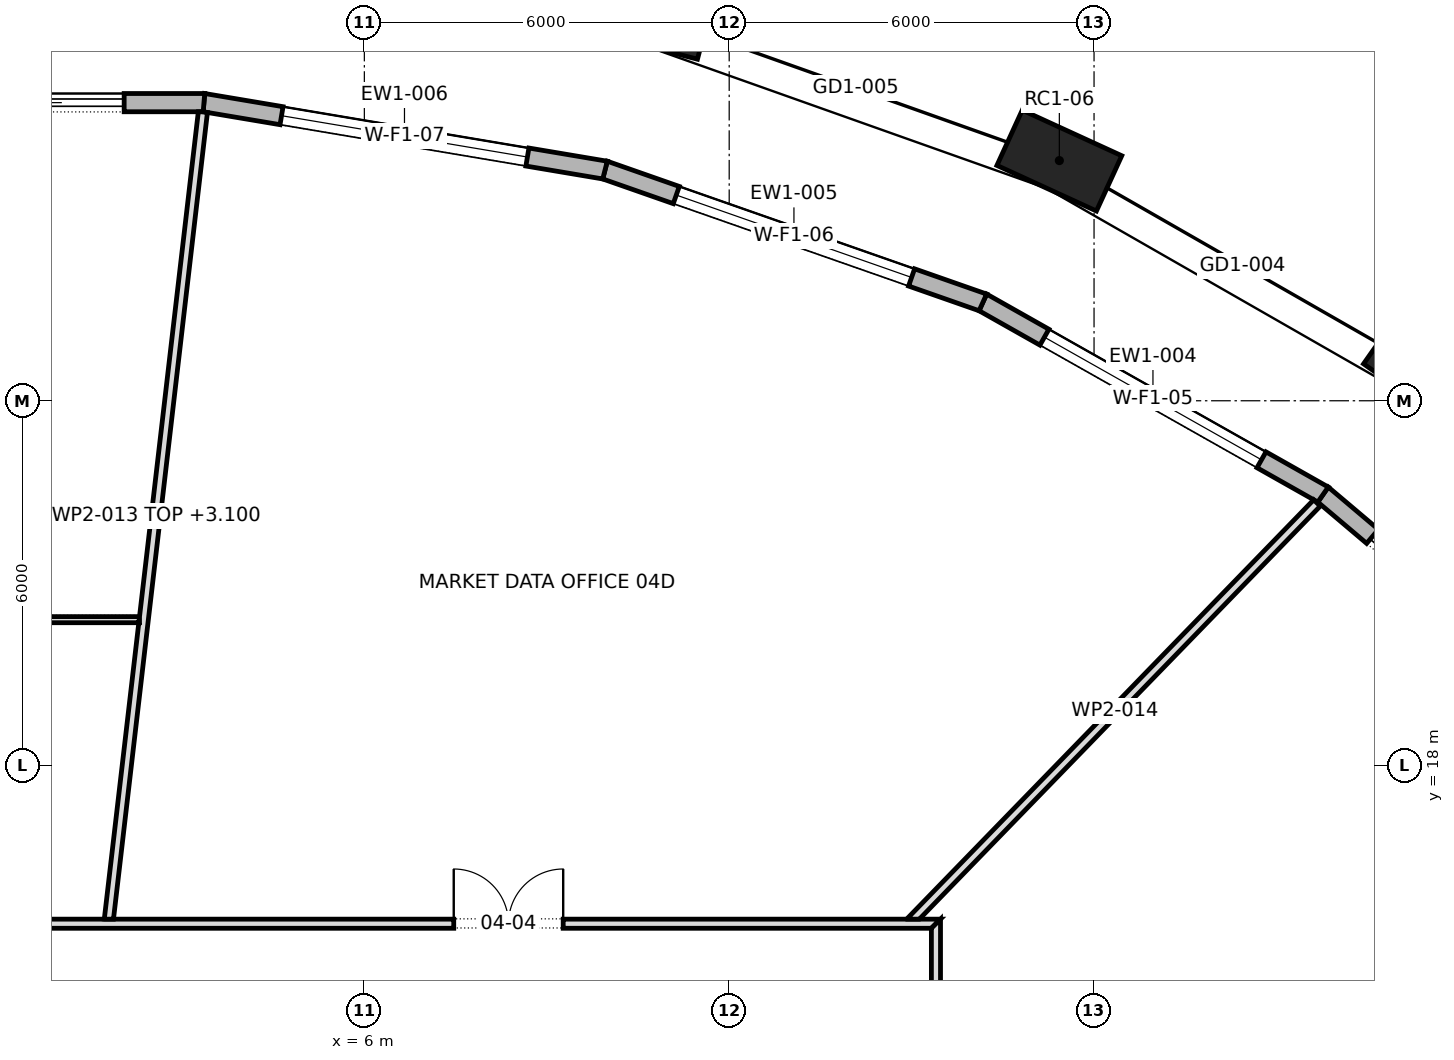
"""IFC4 building model, lengths in metres.
Left out: names, types, materials, properties, quantities, classifications, styles, units other than length and angle.
Written with IfcOpenShell. Run it as: python <this file> out.ifc"""

import sys

from ifc_helpers import new_model, si_unit, direction, frame, frame_2d, origin, origin_2d, place, context, subcontext, project, spatial, polyline, rectangle, outline, extrude, element, fill, save


model = new_model("IFC4")
c1 = context("Model", 3, precision=1e-05, world=origin(), true_north=direction((0.0, 1.0)))
c2 = subcontext(c1, "Body", "Model", "MODEL_VIEW")
j1 = project(units=[si_unit("LENGTHUNIT", "METRE"), si_unit("PLANEANGLEUNIT", "RADIAN")], contexts=[c1])
p1 = place(None, origin())
s1 = spatial("IfcSite", under=j1, at=p1, CompositionType="ELEMENT")
p2 = place(p1, origin())
s2 = spatial("IfcBuilding", under=s1, at=p2, CompositionType="ELEMENT")
p3 = place(p2, frame((0.0, 0.0, 61.3)))
s3 = spatial("IfcBuildingStorey", under=s2, at=p3, CompositionType="ELEMENT", Elevation=61.3)
for number, where, z_axis, x_axis in (
    (1, (23.456, 24.498, 0.0), (0.0, 0.0, 1.0), (-0.818, 0.575, 0.0)),
    (2, (17.429, 27.95, 0.0), (0.0, 0.0, 1.0), (-0.909, 0.417, 0.0)),
    (3, (10.733, 30.327, 0.0), (0.0, 0.0, 1.0), (-0.968, 0.252, 0.0)),
):
    element("IfcColumn", number, at=place(p3, frame(where, z_axis=z_axis, x_axis=x_axis)), inside=s3, PredefinedType="COLUMN", context=c2, shape_type="SweptSolid", body=[
        extrude(rectangle(XDim=1.8, YDim=1.0, at=origin_2d()), origin(), (0.0, 0.0, 1.0), 4.2),
    ])
p4 = place(p3, frame((26.525, 18.434, 0.0), z_axis=(0.0, 0.0, 1.0), x_axis=(-0.763655167989, 0.645624336905, 0.0)))
e4 = element("IfcWall", 4, at=p4, inside=s3, PredefinedType="STANDARD", context=c2, shape_type="SweptSolid", body=[
    extrude(outline(polyline([(-0.015, -0.15), (6.246, -0.15), (6.218, 0.15), (0.015, 0.15), (-0.015, -0.15)])), origin(), (0.0, 0.0, 1.0), 3.9),
])
p5 = place(p4, frame((1.066, 0.0, 0.0)))
e5 = element("IfcOpeningElement", 5, at=p5, cuts=e4, PredefinedType="OPENING", context=c2, shape_type="SweptSolid", body=[
    extrude(rectangle(XDim=4.1, YDim=3.45, at=frame_2d((2.05, 1.725))), frame((0.0, 0.162, 0.0), z_axis=(0.0, -1.0, 0.0), x_axis=(1.0, 0.0, 0.0)), (0.0, 0.0, 1.0), 0.324),
])
p6 = place(p3, frame((21.766, 22.457, 0.0), z_axis=(0.0, 0.0, 1.0), x_axis=(-0.870673928577, 0.491860661262, 0.0)))
e6 = element("IfcWall", 6, at=p6, inside=s3, PredefinedType="STANDARD", context=c2, shape_type="SweptSolid", body=[
    extrude(outline(polyline([(-0.014, -0.15), (6.438, -0.15), (6.411, 0.15), (0.014, 0.15), (-0.014, -0.15)])), origin(), (0.0, 0.0, 1.0), 3.9),
])
p7 = place(p6, frame((1.163, 0.0, 0.6)))
e7 = element("IfcOpeningElement", 7, at=p7, cuts=e6, PredefinedType="OPENING", context=c2, shape_type="SweptSolid", body=[
    extrude(rectangle(XDim=4.1, YDim=2.85, at=frame_2d((2.05, 1.425))), frame((0.0, 0.162, 0.0), z_axis=(0.0, -1.0, 0.0), x_axis=(1.0, 0.0, 0.0)), (0.0, 0.0, 1.0), 0.324),
])
p8 = place(p3, frame((16.172, 25.617, 0.0), z_axis=(0.0, 0.0, 1.0), x_axis=(-0.94380689486, 0.330497420889, 0.0)))
e8 = element("IfcWall", 8, at=p8, inside=s3, PredefinedType="STANDARD", context=c2, shape_type="SweptSolid", body=[
    extrude(outline(polyline([(-0.013, -0.15), (6.597, -0.15), (6.571, 0.15), (0.013, 0.15), (-0.013, -0.15)])), origin(), (0.0, 0.0, 1.0), 3.9),
])
p9 = place(p8, frame((1.242, 0.0, 0.6)))
e9 = element("IfcOpeningElement", 9, at=p9, cuts=e8, PredefinedType="OPENING", context=c2, shape_type="SweptSolid", body=[
    extrude(rectangle(XDim=4.1, YDim=2.85, at=frame_2d((2.05, 1.425))), frame((0.0, 0.162, 0.0), z_axis=(0.0, -1.0, 0.0), x_axis=(1.0, 0.0, 0.0)), (0.0, 0.0, 1.0), 0.324),
])
p10 = place(p3, frame((9.958, 27.793, 0.0), z_axis=(0.0, 0.0, 1.0), x_axis=(-0.986153133093, 0.165837263877, 0.0)))
e10 = element("IfcWall", 10, at=p10, inside=s3, PredefinedType="STANDARD", context=c2, shape_type="SweptSolid", body=[
    extrude(outline(polyline([(-0.013, -0.15), (6.7, -0.15), (6.676, 0.15), (0.013, 0.15), (-0.013, -0.15)])), origin(), (0.0, 0.0, 1.0), 3.9),
])
p11 = place(p10, frame((1.294, 0.0, 0.6)))
e11 = element("IfcOpeningElement", 11, at=p11, cuts=e10, PredefinedType="OPENING", context=c2, shape_type="SweptSolid", body=[
    extrude(rectangle(XDim=4.1, YDim=2.85, at=frame_2d((2.05, 1.425))), frame((0.0, 0.162, 0.0), z_axis=(0.0, -1.0, 0.0), x_axis=(1.0, 0.0, 0.0)), (0.0, 0.0, 1.0), 0.324),
])
p12 = place(p3, frame((3.362, 28.903, 0.0), z_axis=(0.0, 0.0, 1.0), x_axis=(-1.0, 0.0, 0.0)))
e12 = element("IfcWall", 12, at=p12, inside=s3, PredefinedType="STANDARD", context=c2, shape_type="SweptSolid", body=[
    extrude(outline(polyline([(-0.012, -0.15), (6.737, -0.15), (6.712, 0.15), (0.012, 0.15), (-0.012, -0.15)])), origin(), (0.0, 0.0, 1.0), 3.9),
])
p13 = place(p12, frame((1.312, 0.0, 0.0)))
e13 = element("IfcOpeningElement", 13, at=p13, cuts=e12, PredefinedType="OPENING", context=c2, shape_type="SweptSolid", body=[
    extrude(rectangle(XDim=4.1, YDim=3.45, at=frame_2d((2.05, 1.725))), frame((0.0, 0.162, 0.0), z_axis=(0.0, -1.0, 0.0), x_axis=(1.0, 0.0, 0.0)), (0.0, 0.0, 1.0), 0.324),
])
p14 = place(p3, frame((-15.475, 15.4, 0.0), z_axis=(0.0, 0.0, 1.0), x_axis=(1.0, 0.0, 0.0)))
e14 = element("IfcWall", 14, at=p14, inside=s3, PredefinedType="PARTITIONING", context=c2, shape_type="SweptSolid", body=[
    extrude(outline(polyline([(0.15, -0.075), (2.066, -0.075), (3.981, -0.075), (5.897, -0.075), (7.812, -0.075), (9.728, -0.075), (11.644, -0.075), (13.56, -0.075), (15.475, -0.075), (17.391, -0.075), (19.306, -0.075), (21.222, -0.075), (23.138, -0.075), (25.053, -0.075), (26.969, -0.075), (28.885, -0.075), (30.8, -0.075), (30.95, 0.075), (29.016, 0.075), (27.081, 0.075), (25.147, 0.075), (23.212, 0.075), (21.278, 0.075), (19.344, 0.075), (17.409, 0.075), (15.475, 0.075), (13.541, 0.075), (11.606, 0.075), (9.672, 0.075), (7.738, 0.075), (5.803, 0.075), (3.869, 0.075), (1.935, 0.075), (0.0, 0.075), (0.15, -0.075)])), origin(), (0.0, 0.0, 1.0), 3.9),
])
p15 = place(p14, frame((22.945, 0.0, 0.0)))
e15 = element("IfcOpeningElement", 15, at=p15, cuts=e14, PredefinedType="OPENING", context=c2, shape_type="SweptSolid", body=[
    extrude(rectangle(XDim=1.8, YDim=2.1, at=frame_2d((0.9, 1.05))), frame((0.0, 0.087, 0.0), z_axis=(0.0, -1.0, 0.0), x_axis=(1.0, 0.0, 0.0)), (0.0, 0.0, 1.0), 0.174),
])
p16 = place(p14, frame((11.0, 0.0, 0.0)))
e16 = element("IfcOpeningElement", 16, at=p16, cuts=e14, PredefinedType="OPENING", context=c2, shape_type="SweptSolid", body=[
    extrude(rectangle(XDim=1.0, YDim=2.1, at=frame_2d((0.5, 1.05))), frame((0.0, 0.087, 0.0), z_axis=(0.0, -1.0, 0.0), x_axis=(1.0, 0.0, 0.0)), (0.0, 0.0, 1.0), 0.174),
])
p17 = place(p3, frame((-12.843, 20.4, 0.0), z_axis=(0.0, 0.0, 1.0), x_axis=(1.0, 0.0, 0.0)))
e17 = element("IfcWall", 17, at=p17, inside=s3, PredefinedType="PARTITIONING", context=c2, shape_type="SweptSolid", body=[
    extrude(outline(polyline([(0.063, -0.05), (1.947, -0.05), (3.831, -0.05), (5.714, -0.05), (7.598, -0.05), (9.482, -0.05), (11.366, -0.05), (13.25, -0.05), (15.134, -0.05), (15.146, 0.049), (15.146, 0.05), (13.252, 0.05), (11.359, 0.05), (9.466, 0.05), (7.573, 0.05), (5.68, 0.05), (3.786, 0.05), (1.893, 0.05), (0.0, 0.05), (0.0, 0.049), (0.063, -0.05)])), origin(), (0.0, 0.0, 1.0), 3.9),
])
p18 = place(p17, frame((7.128, 0.0, 0.0)))
e18 = element("IfcOpeningElement", 18, at=p18, cuts=e17, PredefinedType="OPENING", context=c2, shape_type="SweptSolid", body=[
    extrude(rectangle(XDim=0.9, YDim=2.1, at=frame_2d((0.45, 1.05))), frame((0.0, 0.062, 0.0), z_axis=(0.0, -1.0, 0.0), x_axis=(1.0, 0.0, 0.0)), (0.0, 0.0, 1.0), 0.124),
])
p19 = place(p3, frame((1.798, 15.467, 0.0), z_axis=(0.0, 0.0, 1.0), x_axis=(0.115693975805, 0.993284905736, 0.0)))
e19 = element("IfcWall", 19, at=p19, inside=s3, PredefinedType="PARTITIONING", context=c2, shape_type="SweptSolid", body=[
    extrude(outline(polyline([(13.373, -0.075), (13.373, 0.028), (13.367, 0.075), (11.695, 0.075), (10.022, 0.075), (8.35, 0.075), (6.678, 0.075), (5.005, 0.075), (4.909, 0.064), (4.908, 0.075), (3.272, 0.075), (1.636, 0.075), (0.0, 0.075), (0.0, 0.073), (0.017, -0.075), (1.925, -0.075), (3.833, -0.075), (5.741, -0.075), (7.649, -0.075), (9.557, -0.075), (11.465, -0.075), (13.373, -0.075)])), origin(), (0.0, 0.0, 1.0), 3.1),
])
p20 = place(p3, frame((14.972, 15.423, 0.0), z_axis=(0.0, 0.0, 1.0), x_axis=(0.696498460967, 0.717558286044, 0.0)))
e20 = element("IfcWall", 20, at=p20, inside=s3, PredefinedType="PARTITIONING", context=c2, shape_type="SweptSolid", body=[
    extrude(outline(polyline([(0.0, 0.075), (0.0, 0.074), (0.145, -0.075), (2.038, -0.075), (3.931, -0.075), (5.824, -0.075), (7.717, -0.075), (9.61, -0.075), (9.61, 0.075), (7.688, 0.075), (5.766, 0.075), (3.844, 0.075), (1.922, 0.075), (0.0, 0.075)])), origin(), (0.0, 0.0, 1.0), 3.9),
])
p21 = place(p3, frame((15.4, -15.475, 0.0), z_axis=(0.0, 0.0, 1.0), x_axis=(0.0, 1.0, 0.0)))
e21 = element("IfcWall", 21, at=p21, inside=s3, PredefinedType="PARTITIONING", context=c2, shape_type="SweptSolid", body=[
    extrude(outline(polyline([(0.0, -0.075), (1.935, -0.075), (3.869, -0.075), (5.803, -0.075), (7.738, -0.075), (9.672, -0.075), (11.606, -0.075), (13.541, -0.075), (15.475, -0.075), (17.409, -0.075), (19.344, -0.075), (21.278, -0.075), (23.212, -0.075), (25.147, -0.075), (27.081, -0.075), (29.016, -0.075), (30.95, -0.075), (30.8, 0.075), (28.885, 0.075), (26.969, 0.075), (25.053, 0.075), (23.138, 0.075), (21.222, 0.075), (19.306, 0.075), (17.391, 0.075), (15.475, 0.075), (13.56, 0.075), (11.644, 0.075), (9.728, 0.075), (7.812, 0.075), (5.897, 0.075), (3.981, 0.075), (2.066, 0.075), (0.15, 0.075), (0.0, -0.075)])), origin(), (0.0, 0.0, 1.0), 3.9),
])
p22 = place(p21, frame((4.9, 0.0, 0.0)))
e22 = element("IfcOpeningElement", 22, at=p22, cuts=e21, PredefinedType="OPENING", context=c2, shape_type="SweptSolid", body=[
    extrude(rectangle(XDim=1.8, YDim=2.1, at=frame_2d((0.9, 1.05))), frame((0.0, 0.087, 0.0), z_axis=(0.0, -1.0, 0.0), x_axis=(1.0, 0.0, 0.0)), (0.0, 0.0, 1.0), 0.174),
])
p23 = place(p21, frame((14.975, 0.0, 0.0)))
e23 = element("IfcOpeningElement", 23, at=p23, cuts=e21, PredefinedType="OPENING", context=c2, shape_type="SweptSolid", body=[
    extrude(rectangle(XDim=1.0, YDim=2.1, at=frame_2d((0.5, 1.05))), frame((0.0, 0.087, 0.0), z_axis=(0.0, -1.0, 0.0), x_axis=(1.0, 0.0, 0.0)), (0.0, 0.0, 1.0), 0.174),
])
p24 = place(p21, frame((24.25, 0.0, 0.0)))
e24 = element("IfcOpeningElement", 24, at=p24, cuts=e21, PredefinedType="OPENING", context=c2, shape_type="SweptSolid", body=[
    extrude(rectangle(XDim=1.8, YDim=2.1, at=frame_2d((0.9, 1.05))), frame((0.0, 0.087, 0.0), z_axis=(0.0, -1.0, 0.0), x_axis=(1.0, 0.0, 0.0)), (0.0, 0.0, 1.0), 0.174),
])
p25 = place(p5, origin())
e25 = element("IfcDoor", 25, at=p25, inside=s3, OperationType="DOUBLE_DOOR_SLIDING", PredefinedType="DOOR", context=c2, shape_type="SweptSolid", body=[
    extrude(rectangle(XDim=4.1, YDim=3.45, at=frame_2d((2.05, 1.725))), frame((0.0, 0.025, 0.0), z_axis=(0.0, -1.0, 0.0), x_axis=(1.0, 0.0, 0.0)), (0.0, 0.0, 1.0), 0.05),
])
fill(e5, e25)
p26 = place(p7, origin())
e26 = element("IfcWindow", 26, at=p26, inside=s3, PartitioningType="TRIPLE_PANEL_VERTICAL", PredefinedType="WINDOW", context=c2, shape_type="SweptSolid", body=[
    extrude(rectangle(XDim=4.1, YDim=2.85, at=frame_2d((2.05, 1.425))), frame((0.0, 0.03, 0.0), z_axis=(0.0, -1.0, 0.0), x_axis=(1.0, 0.0, 0.0)), (0.0, 0.0, 1.0), 0.06),
])
fill(e7, e26)
p27 = place(p9, origin())
e27 = element("IfcWindow", 27, at=p27, inside=s3, PartitioningType="TRIPLE_PANEL_VERTICAL", PredefinedType="WINDOW", context=c2, shape_type="SweptSolid", body=[
    extrude(rectangle(XDim=4.1, YDim=2.85, at=frame_2d((2.05, 1.425))), frame((0.0, 0.03, 0.0), z_axis=(0.0, -1.0, 0.0), x_axis=(1.0, 0.0, 0.0)), (0.0, 0.0, 1.0), 0.06),
])
fill(e9, e27)
p28 = place(p11, origin())
e28 = element("IfcWindow", 28, at=p28, inside=s3, PartitioningType="TRIPLE_PANEL_VERTICAL", PredefinedType="WINDOW", context=c2, shape_type="SweptSolid", body=[
    extrude(rectangle(XDim=4.1, YDim=2.85, at=frame_2d((2.05, 1.425))), frame((0.0, 0.03, 0.0), z_axis=(0.0, -1.0, 0.0), x_axis=(1.0, 0.0, 0.0)), (0.0, 0.0, 1.0), 0.06),
])
fill(e11, e28)
p29 = place(p13, origin())
e29 = element("IfcDoor", 29, at=p29, inside=s3, OperationType="DOUBLE_DOOR_SLIDING", PredefinedType="DOOR", context=c2, shape_type="SweptSolid", body=[
    extrude(rectangle(XDim=4.1, YDim=3.45, at=frame_2d((2.05, 1.725))), frame((0.0, 0.025, 0.0), z_axis=(0.0, -1.0, 0.0), x_axis=(1.0, 0.0, 0.0)), (0.0, 0.0, 1.0), 0.05),
])
fill(e13, e29)
p30 = place(p15, origin())
e30 = element("IfcDoor", 30, at=p30, inside=s3, OperationType="DOUBLE_DOOR_SINGLE_SWING", PredefinedType="DOOR", context=c2, shape_type="SweptSolid", body=[
    extrude(rectangle(XDim=1.8, YDim=2.1, at=frame_2d((0.9, 1.05))), frame((0.0, 0.025, 0.0), z_axis=(0.0, -1.0, 0.0), x_axis=(1.0, 0.0, 0.0)), (0.0, 0.0, 1.0), 0.05),
])
fill(e15, e30)
save(model, sys.argv[1])
